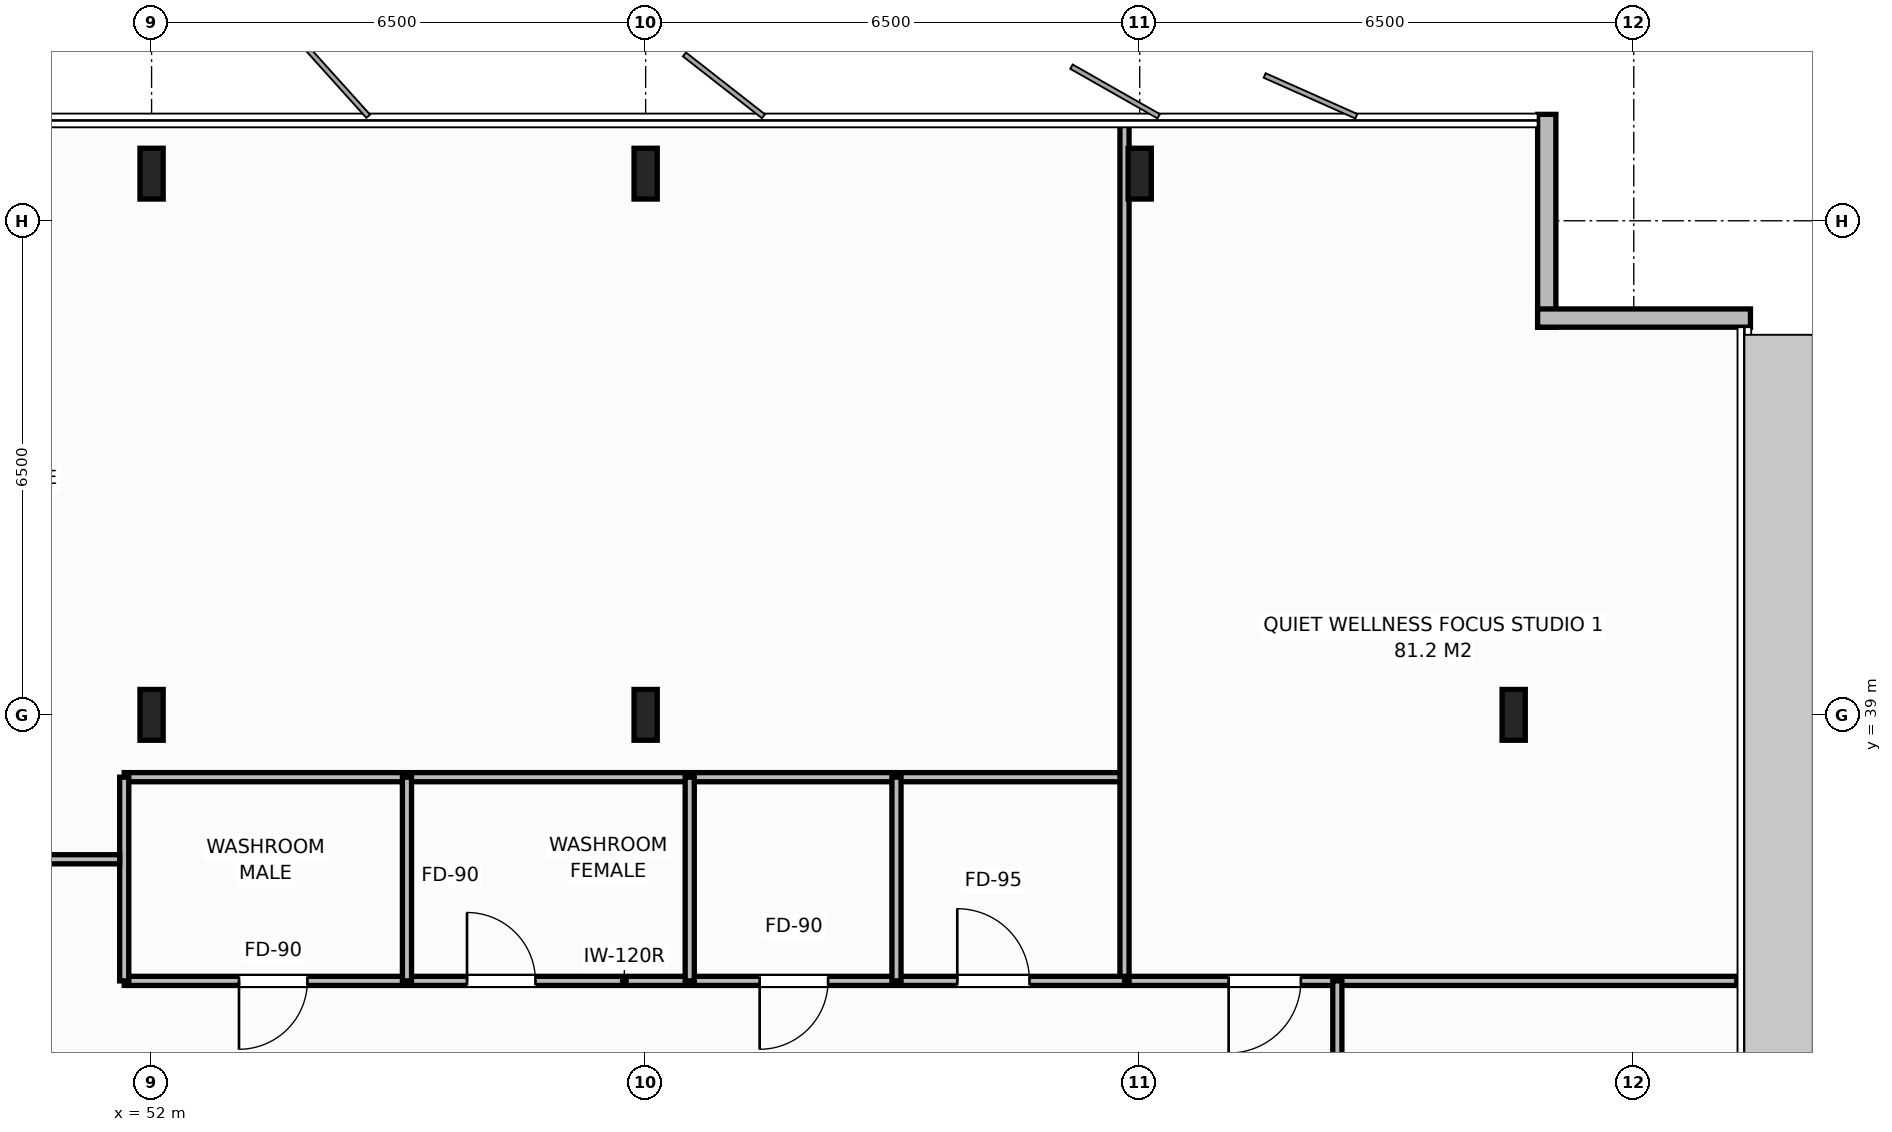
"""IFC4 building model, lengths in metres.
Left out: names, types, materials, properties, quantities, classifications, styles, units other than length and angle.
Written with IfcOpenShell. Run it as: python <this file> out.ifc"""

import sys

from ifc_helpers import new_model, si_unit, direction, frame, frame_2d, origin, origin_2d, place, context, subcontext, project, spatial, rectangle, i_section, extrude, element, fill, save


model = new_model("IFC4")
c1 = context("Model", 3, precision=1e-05, world=origin(), true_north=direction((0.0, 1.0)))
c2 = subcontext(c1, "Body", "Model", "MODEL_VIEW")
j1 = project(units=[si_unit("LENGTHUNIT", "METRE"), si_unit("PLANEANGLEUNIT", "RADIAN")], contexts=[c1])
p1 = place(None, origin())
s1 = spatial("IfcSite", under=j1, at=p1, CompositionType="ELEMENT")
p2 = place(p1, origin())
s2 = spatial("IfcBuilding", under=s1, at=p2, CompositionType="ELEMENT")
p3 = place(p2, frame((0.0, 0.0, 286.4)))
s3 = spatial("IfcBuildingStorey", under=s2, at=p3, CompositionType="ELEMENT", Elevation=286.4)
for number, where, z_axis, x_axis in (
    (1, (58.5, 39.0, 0.0), (0.0, 0.0, 1.0), (1.0, 0.0, 0.0)),
    (2, (52.0, 39.0, 0.0), (0.0, 0.0, 1.0), (1.0, 0.0, 0.0)),
    (3, (52.0, 46.12, 0.0), (0.0, 0.0, 1.0), (1.0, 0.0, 0.0)),
    (4, (58.5, 46.12, 0.0), (0.0, 0.0, 1.0), (1.0, 0.0, 0.0)),
    (5, (65.0, 46.12, 0.0), (0.0, 0.0, 1.0), (1.0, 0.0, 0.0)),
    (6, (69.92, 39.0, 0.0), (0.0, 0.0, 1.0), (1.0, 0.0, 0.0)),
):
    element("IfcColumn", number, at=place(p3, frame(where, z_axis=z_axis, x_axis=x_axis)), inside=s3, PredefinedType="COLUMN", context=c2, shape_type="SweptSolid", body=[
        extrude(i_section(OverallWidth=0.305, OverallDepth=0.668, WebThickness=0.021, FlangeThickness=0.04, at=origin_2d()), origin(), (0.0, 0.0, 1.0), 4.0),
    ])
p4 = place(p3, frame((70.355, 46.9, 0.0), z_axis=(0.0, 0.0, 1.0), x_axis=(0.0, -1.0, 0.0)))
e7 = element("IfcWall", 7, at=p4, inside=s3, PredefinedType="STANDARD", context=c2, shape_type="SweptSolid", body=[
    extrude(rectangle(XDim=2.8, YDim=0.24, at=frame_2d((1.4, 0.0))), origin(), (0.0, 0.0, 1.0), 3.788),
])
p5 = place(p3, frame((70.235, 44.22, 0.0), z_axis=(0.0, 0.0, 1.0), x_axis=(1.0, 0.0, 0.0)))
e8 = element("IfcWall", 8, at=p5, inside=s3, PredefinedType="STANDARD", context=c2, shape_type="SweptSolid", body=[
    extrude(rectangle(XDim=2.8, YDim=0.24, at=frame_2d((1.4, 0.0))), origin(), (0.0, 0.0, 1.0), 3.788),
])
p6 = place(p3, frame((51.64, 35.5, 0.0), z_axis=(0.0, 0.0, 1.0), x_axis=(1.0, 0.0, 0.0)))
e9 = element("IfcWall", 9, at=p6, inside=s3, PredefinedType="PARTITIONING", context=c2, shape_type="SweptSolid", body=[
    extrude(rectangle(XDim=13.16, YDim=0.12, at=frame_2d((6.58, 0.0))), origin(), (0.0, 0.0, 1.0), 3.788),
])
p7 = place(p6, frame((1.51, 0.0, 0.0)))
e10 = element("IfcOpeningElement", 10, at=p7, cuts=e9, PredefinedType="OPENING", context=c2, shape_type="SweptSolid", body=[
    extrude(rectangle(XDim=0.9, YDim=2.15, at=frame_2d((0.45, 1.075))), frame((0.0, 0.07, 0.0), z_axis=(0.0, -1.0, 0.0), x_axis=(1.0, 0.0, 0.0)), (0.0, 0.0, 1.0), 0.14),
])
p8 = place(p6, frame((4.51, 0.0, 0.0)))
e11 = element("IfcOpeningElement", 11, at=p8, cuts=e9, PredefinedType="OPENING", context=c2, shape_type="SweptSolid", body=[
    extrude(rectangle(XDim=0.9, YDim=2.15, at=frame_2d((0.45, 1.075))), frame((0.0, 0.07, 0.0), z_axis=(0.0, -1.0, 0.0), x_axis=(1.0, 0.0, 0.0)), (0.0, 0.0, 1.0), 0.14),
])
p9 = place(p6, frame((8.36, 0.0, 0.0)))
e12 = element("IfcOpeningElement", 12, at=p9, cuts=e9, PredefinedType="OPENING", context=c2, shape_type="SweptSolid", body=[
    extrude(rectangle(XDim=0.9, YDim=2.15, at=frame_2d((0.45, 1.075))), frame((0.0, 0.07, 0.0), z_axis=(0.0, -1.0, 0.0), x_axis=(1.0, 0.0, 0.0)), (0.0, 0.0, 1.0), 0.14),
])
p10 = place(p6, frame((10.96, 0.0, 0.0)))
e13 = element("IfcOpeningElement", 13, at=p10, cuts=e9, PredefinedType="OPENING", context=c2, shape_type="SweptSolid", body=[
    extrude(rectangle(XDim=0.95, YDim=2.15, at=frame_2d((0.475, 1.075))), frame((0.0, 0.07, 0.0), z_axis=(0.0, -1.0, 0.0), x_axis=(1.0, 0.0, 0.0)), (0.0, 0.0, 1.0), 0.14),
])
p11 = place(p3, frame((51.64, 38.18, 0.0), z_axis=(0.0, 0.0, 1.0), x_axis=(1.0, 0.0, 0.0)))
e14 = element("IfcWall", 14, at=p11, inside=s3, PredefinedType="PARTITIONING", context=c2, shape_type="SweptSolid", body=[
    extrude(rectangle(XDim=13.16, YDim=0.12, at=frame_2d((6.58, 0.0))), origin(), (0.0, 0.0, 1.0), 3.788),
])
for number, where, z_axis, x_axis in (
    (15, (51.64, 35.5, 0.0), (0.0, 0.0, 1.0), (0.0, 1.0, 0.0)),
    (16, (55.36, 35.5, 0.0), (0.0, 0.0, 1.0), (0.0, 1.0, 0.0)),
    (17, (59.08, 35.5, 0.0), (0.0, 0.0, 1.0), (0.0, 1.0, 0.0)),
    (18, (61.8, 35.5, 0.0), (0.0, 0.0, 1.0), (0.0, 1.0, 0.0)),
):
    element("IfcWall", number, at=place(p3, frame(where, z_axis=z_axis, x_axis=x_axis)), inside=s3, PredefinedType="PARTITIONING", context=c2, shape_type="SweptSolid", body=[
        extrude(rectangle(XDim=2.68, YDim=0.12, at=frame_2d((1.34, 0.0))), origin(), (0.0, 0.0, 1.0), 3.788),
    ])
p12 = place(p3, frame((64.8, 35.56, 0.0), z_axis=(0.0, 0.0, 1.0), x_axis=(0.0, 1.0, 0.0)))
e19 = element("IfcWall", 19, at=p12, inside=s3, PredefinedType="PARTITIONING", context=c2, shape_type="SweptSolid", body=[
    extrude(rectangle(XDim=11.32, YDim=0.12, at=frame_2d((5.66, 0.0))), origin(), (0.0, 0.0, 1.0), 2.988),
])
p13 = place(p3, frame((38.86, 37.1, 0.0), z_axis=(0.0, 0.0, 1.0), x_axis=(1.0, 0.0, 0.0)))
e20 = element("IfcWall", 20, at=p13, inside=s3, PredefinedType="PARTITIONING", context=c2, shape_type="SweptSolid", body=[
    extrude(rectangle(XDim=12.72, YDim=0.12, at=frame_2d((6.36, 0.0))), origin(), (0.0, 0.0, 1.0), 3.788),
])
p14 = place(p13, frame((3.816, 0.0, 0.0)))
e21 = element("IfcOpeningElement", 21, at=p14, cuts=e20, PredefinedType="OPENING", context=c2, shape_type="SweptSolid", body=[
    extrude(rectangle(XDim=0.95, YDim=2.15, at=frame_2d((0.475, 1.075))), frame((0.0, 0.07, 0.0), z_axis=(0.0, -1.0, 0.0), x_axis=(1.0, 0.0, 0.0)), (0.0, 0.0, 1.0), 0.14),
])
p15 = place(p3, frame((64.86, 35.5, 0.0), z_axis=(0.0, 0.0, 1.0), x_axis=(1.0, 0.0, 0.0)))
e22 = element("IfcWall", 22, at=p15, inside=s3, PredefinedType="PARTITIONING", context=c2, shape_type="SweptSolid", body=[
    extrude(rectangle(XDim=7.995, YDim=0.12, at=frame_2d((3.998, 0.0))), origin(), (0.0, 0.0, 1.0), 3.788),
])
p16 = place(p15, frame((1.31, 0.0, 0.0)))
e23 = element("IfcOpeningElement", 23, at=p16, cuts=e22, PredefinedType="OPENING", context=c2, shape_type="SweptSolid", body=[
    extrude(rectangle(XDim=0.95, YDim=2.15, at=frame_2d((0.475, 1.075))), frame((0.0, 0.07, 0.0), z_axis=(0.0, -1.0, 0.0), x_axis=(1.0, 0.0, 0.0)), (0.0, 0.0, 1.0), 0.14),
])
p17 = place(p3, frame((67.6, 16.5, 0.0), z_axis=(0.0, 0.0, 1.0), x_axis=(0.0, 1.0, 0.0)))
e24 = element("IfcWall", 24, at=p17, inside=s3, PredefinedType="PARTITIONING", context=c2, shape_type="SweptSolid", body=[
    extrude(rectangle(XDim=19.0, YDim=0.12, at=frame_2d((9.5, 0.0))), origin(), (0.0, 0.0, 1.0), 3.788),
])
p18 = place(p17, frame((9.025, 0.0, 0.0)))
e25 = element("IfcOpeningElement", 25, at=p18, cuts=e24, PredefinedType="OPENING", context=c2, shape_type="SweptSolid", body=[
    extrude(rectangle(XDim=0.95, YDim=2.15, at=frame_2d((0.475, 1.075))), frame((0.0, 0.07, 0.0), z_axis=(0.0, -1.0, 0.0), x_axis=(1.0, 0.0, 0.0)), (0.0, 0.0, 1.0), 0.14),
])
p19 = place(p7, origin())
e26 = element("IfcDoor", 26, at=p19, inside=s3, OperationType="SINGLE_SWING_RIGHT", PredefinedType="DOOR", context=c2, shape_type="SweptSolid", body=[
    extrude(rectangle(XDim=0.9, YDim=2.15, at=frame_2d((0.45, 1.075))), frame((0.0, 0.025, 0.0), z_axis=(0.0, -1.0, 0.0), x_axis=(1.0, 0.0, 0.0)), (0.0, 0.0, 1.0), 0.05),
])
fill(e10, e26)
p20 = place(p8, origin())
e27 = element("IfcDoor", 27, at=p20, inside=s3, OperationType="SINGLE_SWING_LEFT", PredefinedType="DOOR", context=c2, shape_type="SweptSolid", body=[
    extrude(rectangle(XDim=0.9, YDim=2.15, at=frame_2d((0.45, 1.075))), frame((0.0, 0.025, 0.0), z_axis=(0.0, -1.0, 0.0), x_axis=(1.0, 0.0, 0.0)), (0.0, 0.0, 1.0), 0.05),
])
fill(e11, e27)
p21 = place(p9, origin())
e28 = element("IfcDoor", 28, at=p21, inside=s3, OperationType="SINGLE_SWING_RIGHT", PredefinedType="DOOR", context=c2, shape_type="SweptSolid", body=[
    extrude(rectangle(XDim=0.9, YDim=2.15, at=frame_2d((0.45, 1.075))), frame((0.0, 0.025, 0.0), z_axis=(0.0, -1.0, 0.0), x_axis=(1.0, 0.0, 0.0)), (0.0, 0.0, 1.0), 0.05),
])
fill(e12, e28)
p22 = place(p10, origin())
e29 = element("IfcDoor", 29, at=p22, inside=s3, OperationType="SINGLE_SWING_LEFT", PredefinedType="DOOR", context=c2, shape_type="SweptSolid", body=[
    extrude(rectangle(XDim=0.95, YDim=2.15, at=frame_2d((0.475, 1.075))), frame((0.0, 0.025, 0.0), z_axis=(0.0, -1.0, 0.0), x_axis=(1.0, 0.0, 0.0)), (0.0, 0.0, 1.0), 0.05),
])
fill(e13, e29)
p23 = place(p16, origin())
e30 = element("IfcDoor", 30, at=p23, inside=s3, OperationType="SINGLE_SWING_RIGHT", PredefinedType="DOOR", context=c2, shape_type="SweptSolid", body=[
    extrude(rectangle(XDim=0.95, YDim=2.15, at=frame_2d((0.475, 1.075))), frame((0.0, 0.025, 0.0), z_axis=(0.0, -1.0, 0.0), x_axis=(1.0, 0.0, 0.0)), (0.0, 0.0, 1.0), 0.05),
])
fill(e23, e30)
save(model, sys.argv[1])
